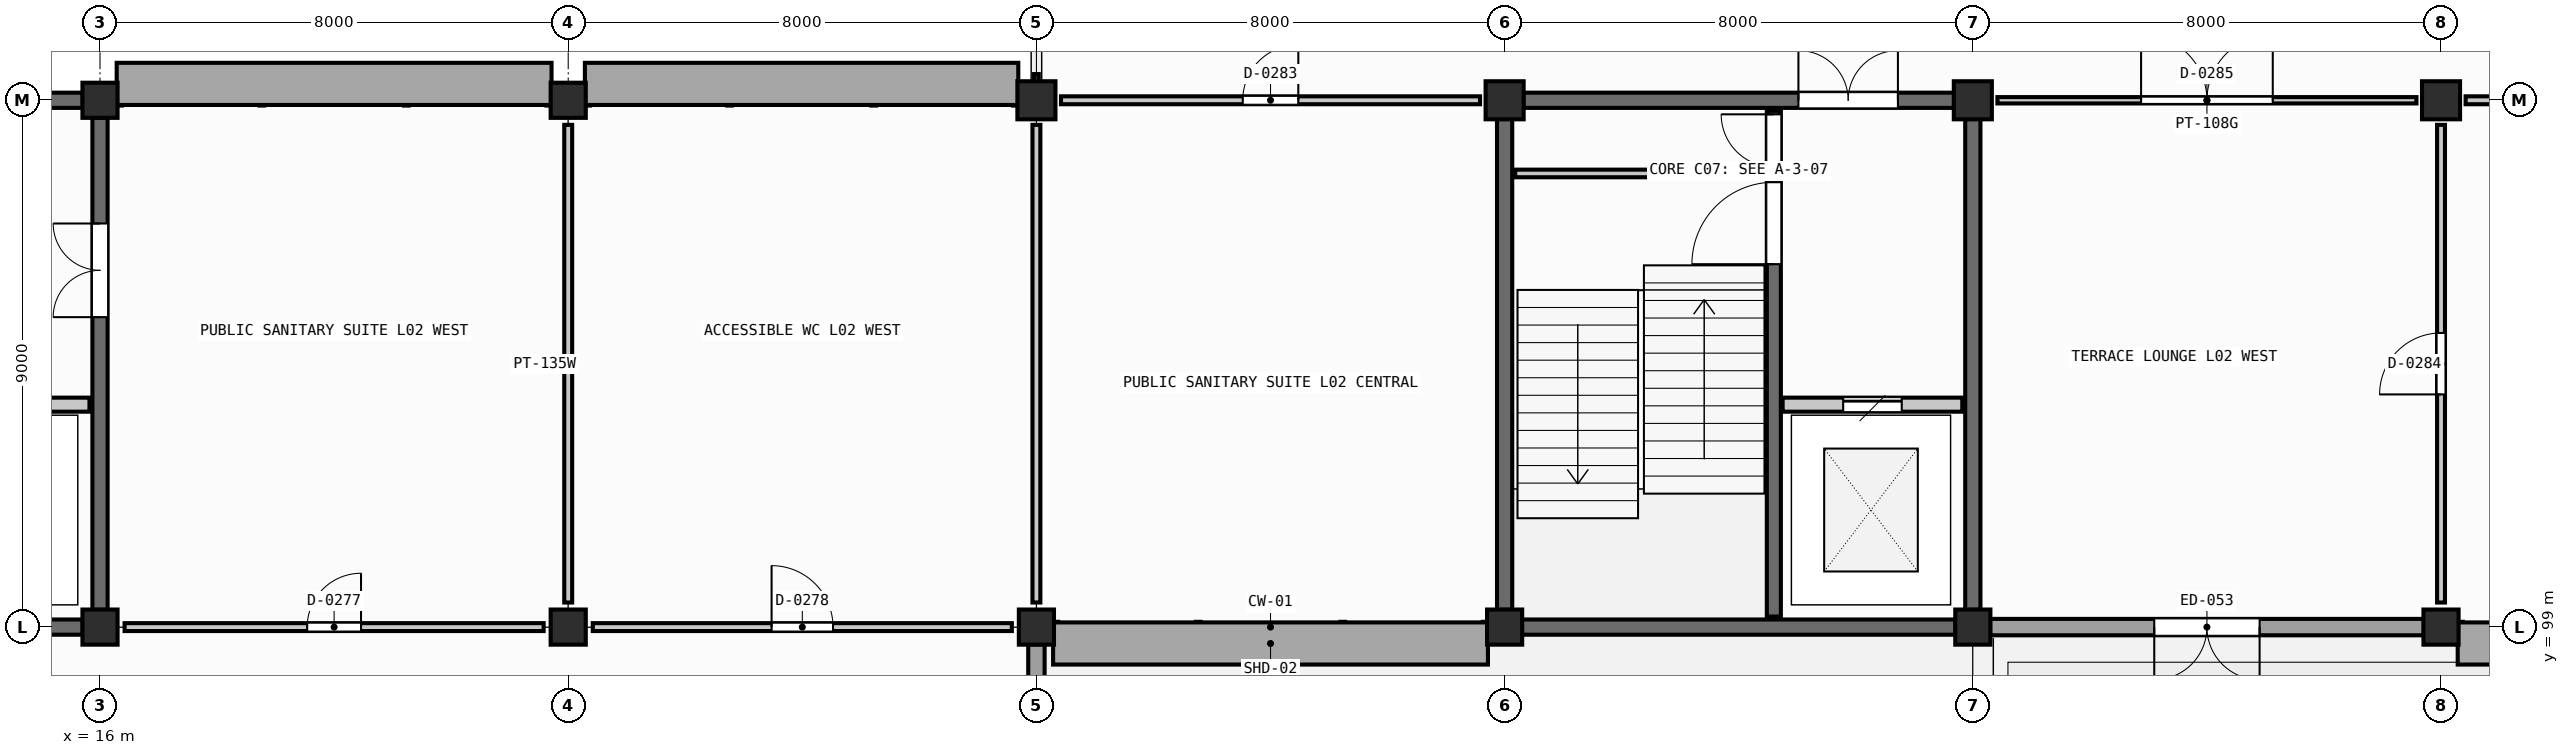
"""IFC4 building model, lengths in metres.
Left out: names, types, materials, properties, quantities, classifications, styles, units other than length and angle.
Written with IfcOpenShell. Run it as: python <this file> out.ifc"""

import sys

from ifc_helpers import new_model, si_unit, direction, frame, frame_2d, origin, origin_2d, place, context, subcontext, project, spatial, rectangle, extrude, element, fill, save


model = new_model("IFC4")
c1 = context("Model", 3, precision=1e-05, world=origin(), true_north=direction((0.0, 1.0)))
c2 = subcontext(c1, "Body", "Model", "MODEL_VIEW")
j1 = project(units=[si_unit("LENGTHUNIT", "METRE"), si_unit("PLANEANGLEUNIT", "RADIAN")], contexts=[c1])
p1 = place(None, origin())
s1 = spatial("IfcSite", under=j1, at=p1, CompositionType="ELEMENT")
p2 = place(p1, origin())
s2 = spatial("IfcBuilding", under=s1, at=p2, CompositionType="ELEMENT")
p3 = place(p2, frame((0.0, 0.0, 9.0)))
s3 = spatial("IfcBuildingStorey", under=s2, at=p3, CompositionType="ELEMENT", Elevation=9.0)
for number, where, z_axis, x_axis in (
    (1, (16.0, 99.0, 0.0), (0.0, 0.0, 1.0), (1.0, 0.0, 0.0)),
    (2, (16.0, 108.0, 0.0), (0.0, 0.0, 1.0), (1.0, 0.0, 0.0)),
    (3, (24.0, 99.0, 0.0), (0.0, 0.0, 1.0), (1.0, 0.0, 0.0)),
    (4, (24.0, 108.0, 0.0), (0.0, 0.0, 1.0), (1.0, 0.0, 0.0)),
    (5, (32.0, 99.0, 0.0), (0.0, 0.0, 1.0), (1.0, 0.0, 0.0)),
):
    element("IfcColumn", number, at=place(p3, frame(where, z_axis=z_axis, x_axis=x_axis)), inside=s3, PredefinedType="COLUMN", context=c2, shape_type="SweptSolid", body=[
        extrude(rectangle(XDim=0.6, YDim=0.6, at=origin_2d()), origin(), (0.0, 0.0, 1.0), 4.2),
    ])
p4 = place(p3, frame((32.0, 108.0, 0.0), z_axis=(0.0, 0.0, 1.0), x_axis=(1.0, 0.0, 0.0)))
e6 = element("IfcColumn", 6, at=p4, inside=s3, PredefinedType="COLUMN", context=c2, shape_type="SweptSolid", body=[
    extrude(rectangle(XDim=0.65, YDim=0.65, at=origin_2d()), origin(), (0.0, 0.0, 1.0), 4.2),
])
p5 = place(p3, frame((40.0, 99.0, 0.0), z_axis=(0.0, 0.0, 1.0), x_axis=(1.0, 0.0, 0.0)))
e7 = element("IfcColumn", 7, at=p5, inside=s3, PredefinedType="COLUMN", context=c2, shape_type="SweptSolid", body=[
    extrude(rectangle(XDim=0.6, YDim=0.6, at=origin_2d()), origin(), (0.0, 0.0, 1.0), 4.2),
])
p6 = place(p3, frame((40.0, 108.0, 0.0), z_axis=(0.0, 0.0, 1.0), x_axis=(1.0, 0.0, 0.0)))
e8 = element("IfcColumn", 8, at=p6, inside=s3, PredefinedType="COLUMN", context=c2, shape_type="SweptSolid", body=[
    extrude(rectangle(XDim=0.65, YDim=0.65, at=origin_2d()), origin(), (0.0, 0.0, 1.0), 4.2),
])
p7 = place(p3, frame((48.0, 99.0, 0.0), z_axis=(0.0, 0.0, 1.0), x_axis=(1.0, 0.0, 0.0)))
e9 = element("IfcColumn", 9, at=p7, inside=s3, PredefinedType="COLUMN", context=c2, shape_type="SweptSolid", body=[
    extrude(rectangle(XDim=0.6, YDim=0.6, at=origin_2d()), origin(), (0.0, 0.0, 1.0), 4.2),
])
p8 = place(p3, frame((48.0, 108.0, 0.0), z_axis=(0.0, 0.0, 1.0), x_axis=(1.0, 0.0, 0.0)))
e10 = element("IfcColumn", 10, at=p8, inside=s3, PredefinedType="COLUMN", context=c2, shape_type="SweptSolid", body=[
    extrude(rectangle(XDim=0.65, YDim=0.65, at=origin_2d()), origin(), (0.0, 0.0, 1.0), 4.2),
])
p9 = place(p3, frame((56.0, 99.0, 0.0), z_axis=(0.0, 0.0, 1.0), x_axis=(1.0, 0.0, 0.0)))
e11 = element("IfcColumn", 11, at=p9, inside=s3, PredefinedType="COLUMN", context=c2, shape_type="SweptSolid", body=[
    extrude(rectangle(XDim=0.6, YDim=0.6, at=origin_2d()), origin(), (0.0, 0.0, 1.0), 4.2),
])
p10 = place(p3, frame((56.0, 108.0, 0.0), z_axis=(0.0, 0.0, 1.0), x_axis=(1.0, 0.0, 0.0)))
e12 = element("IfcColumn", 12, at=p10, inside=s3, PredefinedType="COLUMN", context=c2, shape_type="SweptSolid", body=[
    extrude(rectangle(XDim=0.65, YDim=0.65, at=origin_2d()), origin(), (0.0, 0.0, 1.0), 4.2),
])
p11 = place(p3, frame((48.295, 99.0, 0.0), z_axis=(0.0, 0.0, 1.0), x_axis=(1.0, 0.0, 0.0)))
e13 = element("IfcWall", 13, at=p11, inside=s3, PredefinedType="SOLIDWALL", context=c2, shape_type="SweptSolid", body=[
    extrude(rectangle(XDim=7.41, YDim=0.28, at=frame_2d((3.705, 0.0))), origin(), (0.0, 0.0, 1.0), 3.05),
])
p12 = place(p11, frame((2.805, 0.0, 0.0)))
e14 = element("IfcOpeningElement", 14, at=p12, cuts=e13, PredefinedType="OPENING", context=c2, shape_type="SweptSolid", body=[
    extrude(rectangle(XDim=1.8, YDim=2.25, at=frame_2d((0.9, 1.125))), frame((0.0, 0.15, 0.0), z_axis=(0.0, -1.0, 0.0), x_axis=(1.0, 0.0, 0.0)), (0.0, 0.0, 1.0), 0.3),
])
p13 = place(p3, frame((32.0, 90.345, 0.0), z_axis=(0.0, 0.0, 1.0), x_axis=(0.0, 1.0, 0.0)))
e15 = element("IfcWall", 15, at=p13, inside=s3, PredefinedType="SOLIDWALL", context=c2, shape_type="SweptSolid", body=[
    extrude(rectangle(XDim=8.36, YDim=0.28, at=frame_2d((4.18, 0.0))), origin(), (0.0, 0.0, 1.0), 3.05),
])
p14 = place(p13, frame((2.305, 0.0, 1.0)))
e16 = element("IfcOpeningElement", 16, at=p14, cuts=e15, PredefinedType="OPENING", context=c2, shape_type="SweptSolid", body=[
    extrude(rectangle(XDim=3.75, YDim=1.4, at=frame_2d((1.875, 0.7))), frame((0.0, 0.15, 0.0), z_axis=(0.0, -1.0, 0.0), x_axis=(1.0, 0.0, 0.0)), (0.0, 0.0, 1.0), 0.3),
])
for number, where, z_axis, x_axis in (
    (17, (8.295, 99.0, 0.0), (0.0, 0.0, 1.0), (1.0, 0.0, 0.0)),
    (18, (8.295, 108.0, 0.0), (0.0, 0.0, 1.0), (1.0, 0.0, 0.0)),
):
    element("IfcWall", number, at=place(p3, frame(where, z_axis=z_axis, x_axis=x_axis)), inside=s3, PredefinedType="SHEAR", context=c2, shape_type="SweptSolid", body=[
        extrude(rectangle(XDim=7.41, YDim=0.26, at=frame_2d((3.705, 0.0))), origin(), (0.0, 0.0, 1.0), 3.985),
    ])
p15 = place(p3, frame((16.0, 99.295, 0.0), z_axis=(0.0, 0.0, 1.0), x_axis=(0.0, 1.0, 0.0)))
e19 = element("IfcWall", 19, at=p15, inside=s3, PredefinedType="SHEAR", context=c2, shape_type="SweptSolid", body=[
    extrude(rectangle(XDim=8.41, YDim=0.26, at=frame_2d((4.205, 0.0))), origin(), (0.0, 0.0, 1.0), 3.985),
])
p16 = place(p15, frame((5.0, 0.0, 0.0)))
e20 = element("IfcOpeningElement", 20, at=p16, cuts=e19, PredefinedType="OPENING", context=c2, shape_type="SweptSolid", body=[
    extrude(rectangle(XDim=1.6, YDim=2.2, at=frame_2d((0.8, 1.1))), frame((0.0, 0.14, 0.0), z_axis=(0.0, -1.0, 0.0), x_axis=(1.0, 0.0, 0.0)), (0.0, 0.0, 1.0), 0.28),
])
p17 = place(p3, frame((12.75, 102.8, 0.0), z_axis=(0.0, 0.0, 1.0), x_axis=(1.0, 0.0, 0.0)))
e21 = element("IfcWall", 21, at=p17, inside=s3, PredefinedType="SHEAR", context=c2, shape_type="SweptSolid", body=[
    extrude(rectangle(XDim=3.07, YDim=0.24, at=frame_2d((1.535, 0.0))), origin(), (0.0, 0.0, 1.0), 3.335),
])
p18 = place(p17, frame((1.035, 0.0, 0.0)))
e22 = element("IfcOpeningElement", 22, at=p18, cuts=e21, PredefinedType="OPENING", context=c2, shape_type="SweptSolid", body=[
    extrude(rectangle(XDim=1.0, YDim=2.15, at=frame_2d((0.5, 1.075))), frame((0.0, 0.13, 0.0), z_axis=(0.0, -1.0, 0.0), x_axis=(1.0, 0.0, 0.0)), (0.0, 0.0, 1.0), 0.26),
])
p19 = place(p3, frame((40.295, 99.0, 0.0), z_axis=(0.0, 0.0, 1.0), x_axis=(1.0, 0.0, 0.0)))
e23 = element("IfcWall", 23, at=p19, inside=s3, PredefinedType="SHEAR", context=c2, shape_type="SweptSolid", body=[
    extrude(rectangle(XDim=7.41, YDim=0.26, at=frame_2d((3.705, 0.0))), origin(), (0.0, 0.0, 1.0), 3.985),
])
p20 = place(p3, frame((40.32, 108.0, 0.0), z_axis=(0.0, 0.0, 1.0), x_axis=(1.0, 0.0, 0.0)))
e24 = element("IfcWall", 24, at=p20, inside=s3, PredefinedType="SHEAR", context=c2, shape_type="SweptSolid", body=[
    extrude(rectangle(XDim=7.36, YDim=0.26, at=frame_2d((3.68, 0.0))), origin(), (0.0, 0.0, 1.0), 3.985),
])
p21 = place(p20, frame((4.7, 0.0, 0.0)))
e25 = element("IfcOpeningElement", 25, at=p21, cuts=e24, PredefinedType="OPENING", context=c2, shape_type="SweptSolid", body=[
    extrude(rectangle(XDim=1.7, YDim=2.25, at=frame_2d((0.85, 1.125))), frame((0.0, 0.14, 0.0), z_axis=(0.0, -1.0, 0.0), x_axis=(1.0, 0.0, 0.0)), (0.0, 0.0, 1.0), 0.28),
])
for number, where, z_axis, x_axis in (
    (26, (40.0, 99.295, 0.0), (0.0, 0.0, 1.0), (0.0, 1.0, 0.0)),
    (27, (48.0, 99.295, 0.0), (0.0, 0.0, 1.0), (0.0, 1.0, 0.0)),
):
    element("IfcWall", number, at=place(p3, frame(where, z_axis=z_axis, x_axis=x_axis)), inside=s3, PredefinedType="SHEAR", context=c2, shape_type="SweptSolid", body=[
        extrude(rectangle(XDim=8.385, YDim=0.26, at=frame_2d((4.192, 0.0))), origin(), (0.0, 0.0, 1.0), 3.985),
    ])
p22 = place(p3, frame((44.6, 99.18, 0.0), z_axis=(0.0, 0.0, 1.0), x_axis=(0.0, 1.0, 0.0)))
e28 = element("IfcWall", 28, at=p22, inside=s3, PredefinedType="SHEAR", context=c2, shape_type="SweptSolid", body=[
    extrude(rectangle(XDim=8.64, YDim=0.24, at=frame_2d((4.32, 0.0))), origin(), (0.0, 0.0, 1.0), 3.985),
])
p23 = place(p22, frame((6.02, 0.0, 0.0)))
e29 = element("IfcOpeningElement", 29, at=p23, cuts=e28, PredefinedType="OPENING", context=c2, shape_type="SweptSolid", body=[
    extrude(rectangle(XDim=1.4, YDim=2.2, at=frame_2d((0.7, 1.1))), frame((0.0, 0.13, 0.0), z_axis=(0.0, -1.0, 0.0), x_axis=(1.0, 0.0, 0.0)), (0.0, 0.0, 1.0), 0.26),
])
p24 = place(p22, frame((7.68, 0.0, 0.0)))
e30 = element("IfcOpeningElement", 30, at=p24, cuts=e28, PredefinedType="OPENING", context=c2, shape_type="SweptSolid", body=[
    extrude(rectangle(XDim=0.9, YDim=2.05, at=frame_2d((0.45, 1.025))), frame((0.0, 0.13, 0.0), z_axis=(0.0, -1.0, 0.0), x_axis=(1.0, 0.0, 0.0)), (0.0, 0.0, 1.0), 0.26),
])
p25 = place(p3, frame((40.18, 106.75, 0.0), z_axis=(0.0, 0.0, 1.0), x_axis=(1.0, 0.0, 0.0)))
e31 = element("IfcWall", 31, at=p25, inside=s3, PredefinedType="PARTITIONING", context=c2, shape_type="SweptSolid", body=[
    extrude(rectangle(XDim=4.28, YDim=0.13, at=frame_2d((2.14, 0.0))), origin(), (0.0, 0.0, 1.0), 3.335),
])
p26 = place(p3, frame((44.75, 102.8, 0.0), z_axis=(0.0, 0.0, 1.0), x_axis=(1.0, 0.0, 0.0)))
e32 = element("IfcWall", 32, at=p26, inside=s3, PredefinedType="SHEAR", context=c2, shape_type="SweptSolid", body=[
    extrude(rectangle(XDim=3.07, YDim=0.24, at=frame_2d((1.535, 0.0))), origin(), (0.0, 0.0, 1.0), 3.335),
])
p27 = place(p26, frame((1.035, 0.0, 0.0)))
e33 = element("IfcOpeningElement", 33, at=p27, cuts=e32, PredefinedType="OPENING", context=c2, shape_type="SweptSolid", body=[
    extrude(rectangle(XDim=1.0, YDim=2.15, at=frame_2d((0.5, 1.075))), frame((0.0, 0.13, 0.0), z_axis=(0.0, -1.0, 0.0), x_axis=(1.0, 0.0, 0.0)), (0.0, 0.0, 1.0), 0.26),
])
p28 = place(p3, frame((16.42, 99.0, 0.0), z_axis=(0.0, 0.0, 1.0), x_axis=(1.0, 0.0, 0.0)))
e34 = element("IfcWall", 34, at=p28, inside=s3, PredefinedType="PLUMBINGWALL", context=c2, shape_type="SweptSolid", body=[
    extrude(rectangle(XDim=7.16, YDim=0.135, at=frame_2d((3.58, 0.0))), origin(), (0.0, 0.0, 1.0), 3.05),
])
p29 = place(p28, frame((3.12, 0.0, 0.0)))
e35 = element("IfcOpeningElement", 35, at=p29, cuts=e34, PredefinedType="OPENING", context=c2, shape_type="SweptSolid", body=[
    extrude(rectangle(XDim=0.92, YDim=2.08, at=frame_2d((0.46, 1.04))), frame((0.0, 0.078, 0.0), z_axis=(0.0, -1.0, 0.0), x_axis=(1.0, 0.0, 0.0)), (0.0, 0.0, 1.0), 0.155),
])
p30 = place(p3, frame((24.42, 99.0, 0.0), z_axis=(0.0, 0.0, 1.0), x_axis=(1.0, 0.0, 0.0)))
e36 = element("IfcWall", 36, at=p30, inside=s3, PredefinedType="PLUMBINGWALL", context=c2, shape_type="SweptSolid", body=[
    extrude(rectangle(XDim=7.16, YDim=0.135, at=frame_2d((3.58, 0.0))), origin(), (0.0, 0.0, 1.0), 3.05),
])
p31 = place(p30, frame((3.055, 0.0, 0.0)))
e37 = element("IfcOpeningElement", 37, at=p31, cuts=e36, PredefinedType="OPENING", context=c2, shape_type="SweptSolid", body=[
    extrude(rectangle(XDim=1.05, YDim=2.1, at=frame_2d((0.525, 1.05))), frame((0.0, 0.078, 0.0), z_axis=(0.0, -1.0, 0.0), x_axis=(1.0, 0.0, 0.0)), (0.0, 0.0, 1.0), 0.155),
])
for number, where, z_axis, x_axis in (
    (38, (24.0, 99.42, 0.0), (0.0, 0.0, 1.0), (0.0, 1.0, 0.0)),
    (39, (32.0, 99.42, 0.0), (0.0, 0.0, 1.0), (0.0, 1.0, 0.0)),
):
    element("IfcWall", number, at=place(p3, frame(where, z_axis=z_axis, x_axis=x_axis)), inside=s3, PredefinedType="PLUMBINGWALL", context=c2, shape_type="SweptSolid", body=[
        extrude(rectangle(XDim=8.16, YDim=0.135, at=frame_2d((4.08, 0.0))), origin(), (0.0, 0.0, 1.0), 3.05),
    ])
p32 = place(p3, frame((32.42, 108.0, 0.0), z_axis=(0.0, 0.0, 1.0), x_axis=(1.0, 0.0, 0.0)))
e40 = element("IfcWall", 40, at=p32, inside=s3, PredefinedType="PLUMBINGWALL", context=c2, shape_type="SweptSolid", body=[
    extrude(rectangle(XDim=7.16, YDim=0.135, at=frame_2d((3.58, 0.0))), origin(), (0.0, 0.0, 1.0), 3.05),
])
p33 = place(p32, frame((3.105, 0.0, 0.0)))
e41 = element("IfcOpeningElement", 41, at=p33, cuts=e40, PredefinedType="OPENING", context=c2, shape_type="SweptSolid", body=[
    extrude(rectangle(XDim=0.95, YDim=2.1, at=frame_2d((0.475, 1.05))), frame((0.0, 0.078, 0.0), z_axis=(0.0, -1.0, 0.0), x_axis=(1.0, 0.0, 0.0)), (0.0, 0.0, 1.0), 0.155),
])
p34 = place(p3, frame((56.0, 99.42, 0.0), z_axis=(0.0, 0.0, 1.0), x_axis=(0.0, 1.0, 0.0)))
e42 = element("IfcWall", 42, at=p34, inside=s3, PredefinedType="PLUMBINGWALL", context=c2, shape_type="SweptSolid", body=[
    extrude(rectangle(XDim=8.16, YDim=0.135, at=frame_2d((4.08, 0.0))), origin(), (0.0, 0.0, 1.0), 3.05),
])
p35 = place(p34, frame((3.555, 0.0, 0.0)))
e43 = element("IfcOpeningElement", 43, at=p35, cuts=e42, PredefinedType="OPENING", context=c2, shape_type="SweptSolid", body=[
    extrude(rectangle(XDim=1.05, YDim=2.1, at=frame_2d((0.525, 1.05))), frame((0.0, 0.078, 0.0), z_axis=(0.0, -1.0, 0.0), x_axis=(1.0, 0.0, 0.0)), (0.0, 0.0, 1.0), 0.155),
])
p36 = place(p3, frame((48.42, 108.0, 0.0), z_axis=(0.0, 0.0, 1.0), x_axis=(1.0, 0.0, 0.0)))
e44 = element("IfcWall", 44, at=p36, inside=s3, PredefinedType="PARTITIONING", context=c2, shape_type="SweptSolid", body=[
    extrude(rectangle(XDim=7.16, YDim=0.108, at=frame_2d((3.58, 0.0))), origin(), (0.0, 0.0, 1.0), 3.05),
])
p37 = place(p36, frame((2.455, 0.0, 0.0)))
e45 = element("IfcOpeningElement", 45, at=p37, cuts=e44, PredefinedType="OPENING", context=c2, shape_type="SweptSolid", body=[
    extrude(rectangle(XDim=2.25, YDim=2.38, at=frame_2d((1.125, 1.19))), frame((0.0, 0.064, 0.0), z_axis=(0.0, -1.0, 0.0), x_axis=(1.0, 0.0, 0.0)), (0.0, 0.0, 1.0), 0.128),
])
p38 = place(p3, frame((56.42, 108.0, 0.0), z_axis=(0.0, 0.0, 1.0), x_axis=(1.0, 0.0, 0.0)))
e46 = element("IfcWall", 46, at=p38, inside=s3, PredefinedType="PLUMBINGWALL", context=c2, shape_type="SweptSolid", body=[
    extrude(rectangle(XDim=6.76, YDim=0.135, at=frame_2d((3.38, 0.0))), origin(), (0.0, 0.0, 1.0), 3.05),
])
p39 = place(p38, frame((2.855, 0.0, 0.0)))
e47 = element("IfcOpeningElement", 47, at=p39, cuts=e46, PredefinedType="OPENING", context=c2, shape_type="SweptSolid", body=[
    extrude(rectangle(XDim=1.05, YDim=2.1, at=frame_2d((0.525, 1.05))), frame((0.0, 0.078, 0.0), z_axis=(0.0, -1.0, 0.0), x_axis=(1.0, 0.0, 0.0)), (0.0, 0.0, 1.0), 0.155),
])
p40 = place(p12, frame((1.8, 0.0, 0.0), z_axis=(0.0, 0.0, 1.0), x_axis=(-1.0, 0.0, 0.0)))
e48 = element("IfcDoor", 48, at=p40, inside=s3, OperationType="DOUBLE_DOOR_SINGLE_SWING", PredefinedType="DOOR", context=c2, shape_type="SweptSolid", body=[
    extrude(rectangle(XDim=1.8, YDim=2.25, at=frame_2d((0.9, 1.125))), frame((0.0, 0.025, 0.0), z_axis=(0.0, -1.0, 0.0), x_axis=(1.0, 0.0, 0.0)), (0.0, 0.0, 1.0), 0.05),
])
fill(e14, e48)
p41 = place(p16, origin())
e49 = element("IfcDoor", 49, at=p41, inside=s3, OperationType="DOUBLE_DOOR_SINGLE_SWING", PredefinedType="DOOR", context=c2, shape_type="SweptSolid", body=[
    extrude(rectangle(XDim=1.6, YDim=2.2, at=frame_2d((0.8, 1.1))), frame((0.0, 0.025, 0.0), z_axis=(0.0, -1.0, 0.0), x_axis=(1.0, 0.0, 0.0)), (0.0, 0.0, 1.0), 0.05),
])
fill(e20, e49)
p42 = place(p23, origin())
e50 = element("IfcDoor", 50, at=p42, inside=s3, OperationType="SINGLE_SWING_LEFT", PredefinedType="DOOR", context=c2, shape_type="SweptSolid", body=[
    extrude(rectangle(XDim=1.4, YDim=2.2, at=frame_2d((0.7, 1.1))), frame((0.0, 0.025, 0.0), z_axis=(0.0, -1.0, 0.0), x_axis=(1.0, 0.0, 0.0)), (0.0, 0.0, 1.0), 0.05),
])
fill(e29, e50)
p43 = place(p24, origin())
e51 = element("IfcDoor", 51, at=p43, inside=s3, OperationType="SINGLE_SWING_RIGHT", PredefinedType="DOOR", context=c2, shape_type="SweptSolid", body=[
    extrude(rectangle(XDim=0.9, YDim=2.05, at=frame_2d((0.45, 1.025))), frame((0.0, 0.025, 0.0), z_axis=(0.0, -1.0, 0.0), x_axis=(1.0, 0.0, 0.0)), (0.0, 0.0, 1.0), 0.05),
])
fill(e30, e51)
p44 = place(p21, origin())
e52 = element("IfcDoor", 52, at=p44, inside=s3, OperationType="DOUBLE_DOOR_SINGLE_SWING", PredefinedType="DOOR", context=c2, shape_type="SweptSolid", body=[
    extrude(rectangle(XDim=1.7, YDim=2.25, at=frame_2d((0.85, 1.125))), frame((0.0, 0.025, 0.0), z_axis=(0.0, -1.0, 0.0), x_axis=(1.0, 0.0, 0.0)), (0.0, 0.0, 1.0), 0.05),
])
fill(e25, e52)
p45 = place(p27, origin())
e53 = element("IfcDoor", 53, at=p45, inside=s3, OperationType="SLIDING_TO_LEFT", PredefinedType="DOOR", context=c2, shape_type="SweptSolid", body=[
    extrude(rectangle(XDim=1.0, YDim=2.15, at=frame_2d((0.5, 1.075))), frame((0.0, 0.025, 0.0), z_axis=(0.0, -1.0, 0.0), x_axis=(1.0, 0.0, 0.0)), (0.0, 0.0, 1.0), 0.05),
])
fill(e33, e53)
p46 = place(p29, origin())
e54 = element("IfcDoor", 54, at=p46, inside=s3, OperationType="SINGLE_SWING_RIGHT", PredefinedType="DOOR", context=c2, shape_type="SweptSolid", body=[
    extrude(rectangle(XDim=0.92, YDim=2.08, at=frame_2d((0.46, 1.04))), frame((0.0, 0.025, 0.0), z_axis=(0.0, -1.0, 0.0), x_axis=(1.0, 0.0, 0.0)), (0.0, 0.0, 1.0), 0.05),
])
fill(e35, e54)
p47 = place(p31, origin())
e55 = element("IfcDoor", 55, at=p47, inside=s3, OperationType="SINGLE_SWING_LEFT", PredefinedType="DOOR", context=c2, shape_type="SweptSolid", body=[
    extrude(rectangle(XDim=1.05, YDim=2.1, at=frame_2d((0.525, 1.05))), frame((0.0, 0.025, 0.0), z_axis=(0.0, -1.0, 0.0), x_axis=(1.0, 0.0, 0.0)), (0.0, 0.0, 1.0), 0.05),
])
fill(e37, e55)
p48 = place(p33, origin())
e56 = element("IfcDoor", 56, at=p48, inside=s3, OperationType="SINGLE_SWING_RIGHT", PredefinedType="DOOR", context=c2, shape_type="SweptSolid", body=[
    extrude(rectangle(XDim=0.95, YDim=2.1, at=frame_2d((0.475, 1.05))), frame((0.0, 0.025, 0.0), z_axis=(0.0, -1.0, 0.0), x_axis=(1.0, 0.0, 0.0)), (0.0, 0.0, 1.0), 0.05),
])
fill(e41, e56)
p49 = place(p35, origin())
e57 = element("IfcDoor", 57, at=p49, inside=s3, OperationType="SINGLE_SWING_LEFT", PredefinedType="DOOR", context=c2, shape_type="SweptSolid", body=[
    extrude(rectangle(XDim=1.05, YDim=2.1, at=frame_2d((0.525, 1.05))), frame((0.0, 0.025, 0.0), z_axis=(0.0, -1.0, 0.0), x_axis=(1.0, 0.0, 0.0)), (0.0, 0.0, 1.0), 0.05),
])
fill(e43, e57)
p50 = place(p37, origin())
e58 = element("IfcDoor", 58, at=p50, inside=s3, OperationType="DOUBLE_DOOR_SINGLE_SWING", PredefinedType="DOOR", context=c2, shape_type="SweptSolid", body=[
    extrude(rectangle(XDim=2.25, YDim=2.38, at=frame_2d((1.125, 1.19))), frame((0.0, 0.025, 0.0), z_axis=(0.0, -1.0, 0.0), x_axis=(1.0, 0.0, 0.0)), (0.0, 0.0, 1.0), 0.05),
])
fill(e45, e58)
save(model, sys.argv[1])
